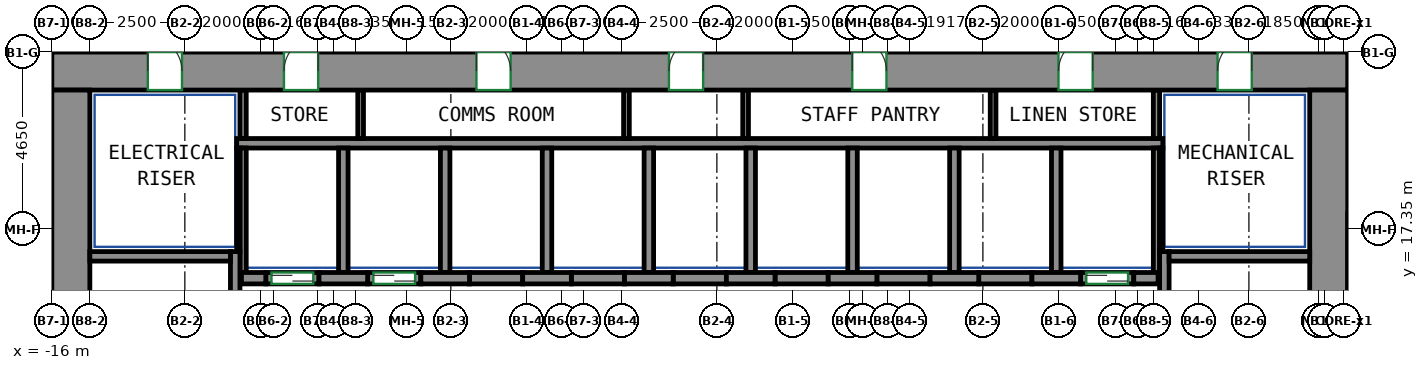
"""IFC4 building model, lengths in metres.
Left out: names, types, materials, properties, quantities, classifications, styles, units other than length and angle.
Written with IfcOpenShell. Run it as: python <this file> out.ifc"""

import sys

from ifc_helpers import new_model, si_unit, direction, frame, frame_2d, origin, place, context, subcontext, project, spatial, rectangle, extrude, source, transform, mapped, element, fill, save


model = new_model("IFC4")
c1 = context("Model", 3, precision=1e-05, world=origin(), true_north=direction((0.0, 1.0)))
c2 = subcontext(c1, "Body", "Model", "MODEL_VIEW")
j1 = project(units=[si_unit("LENGTHUNIT", "METRE"), si_unit("PLANEANGLEUNIT", "RADIAN")], contexts=[c1])
p1 = place(None, origin())
s1 = spatial("IfcSite", under=j1, at=p1, CompositionType="ELEMENT")
p2 = place(p1, origin())
s2 = spatial("IfcBuilding", under=s1, at=p2, CompositionType="ELEMENT")
p3 = place(p2, frame((0.0, 0.0, 63.2)))
s3 = spatial("IfcBuildingStorey", under=s2, at=p3, CompositionType="ELEMENT", Elevation=63.2)
m1 = source(origin(), c2, "Body", "SweptSolid", [
    extrude(rectangle(XDim=34.1, YDim=1.0, at=frame_2d((17.05, 0.0))), origin(), (0.0, 0.0, 1.0), 3.72),
])
p4 = place(p3, frame((-16.0, 21.5, 0.0), z_axis=(0.0, 0.0, 1.0), x_axis=(1.0, 0.0, 0.0)))
e1 = element("IfcWall", 1, at=p4, inside=s3, PredefinedType="SHEAR", context=c2, shape_type="MappedRepresentation", body=[
    mapped(m1, transform((0.0, 0.0, 0.0))),
])
p5 = place(p4, frame((6.108, 0.0, 0.0)))
e2 = element("IfcOpeningElement", 2, at=p5, cuts=e1, PredefinedType="OPENING", context=c2, shape_type="SweptSolid", body=[
    extrude(rectangle(XDim=0.9, YDim=2.1, at=frame_2d((0.45, 1.05))), frame((0.0, 0.51, 0.0), z_axis=(0.0, -1.0, 0.0), x_axis=(1.0, 0.0, 0.0)), (0.0, 0.0, 1.0), 1.02),
])
p6 = place(p4, frame((11.173, 0.0, 0.0)))
e3 = element("IfcOpeningElement", 3, at=p6, cuts=e1, PredefinedType="OPENING", context=c2, shape_type="SweptSolid", body=[
    extrude(rectangle(XDim=0.9, YDim=2.1, at=frame_2d((0.45, 1.05))), frame((0.0, 0.51, 0.0), z_axis=(0.0, -1.0, 0.0), x_axis=(1.0, 0.0, 0.0)), (0.0, 0.0, 1.0), 1.02),
])
p7 = place(p4, frame((16.238, 0.0, 0.0)))
e4 = element("IfcOpeningElement", 4, at=p7, cuts=e1, PredefinedType="OPENING", context=c2, shape_type="SweptSolid", body=[
    extrude(rectangle(XDim=0.9, YDim=2.1, at=frame_2d((0.45, 1.05))), frame((0.0, 0.51, 0.0), z_axis=(0.0, -1.0, 0.0), x_axis=(1.0, 0.0, 0.0)), (0.0, 0.0, 1.0), 1.02),
])
p8 = place(p4, frame((21.062, 0.0, 0.0)))
e5 = element("IfcOpeningElement", 5, at=p8, cuts=e1, PredefinedType="OPENING", context=c2, shape_type="SweptSolid", body=[
    extrude(rectangle(XDim=0.9, YDim=2.1, at=frame_2d((0.45, 1.05))), frame((0.0, 0.51, 0.0), z_axis=(0.0, -1.0, 0.0), x_axis=(1.0, 0.0, 0.0)), (0.0, 0.0, 1.0), 1.02),
])
p9 = place(p4, frame((26.489, 0.0, 0.0)))
e6 = element("IfcOpeningElement", 6, at=p9, cuts=e1, PredefinedType="OPENING", context=c2, shape_type="SweptSolid", body=[
    extrude(rectangle(XDim=0.9, YDim=2.1, at=frame_2d((0.45, 1.05))), frame((0.0, 0.51, 0.0), z_axis=(0.0, -1.0, 0.0), x_axis=(1.0, 0.0, 0.0)), (0.0, 0.0, 1.0), 1.02),
])
p10 = place(p4, frame((2.525, 0.0, 0.0)))
e7 = element("IfcOpeningElement", 7, at=p10, cuts=e1, PredefinedType="OPENING", context=c2, shape_type="SweptSolid", body=[
    extrude(rectangle(XDim=0.9, YDim=2.1, at=frame_2d((0.45, 1.05))), frame((0.0, 0.51, 0.0), z_axis=(0.0, -1.0, 0.0), x_axis=(1.0, 0.0, 0.0)), (0.0, 0.0, 1.0), 1.02),
])
p11 = place(p4, frame((30.675, 0.0, 0.0)))
e8 = element("IfcOpeningElement", 8, at=p11, cuts=e1, PredefinedType="OPENING", context=c2, shape_type="SweptSolid", body=[
    extrude(rectangle(XDim=0.9, YDim=2.1, at=frame_2d((0.45, 1.05))), frame((0.0, 0.51, 0.0), z_axis=(0.0, -1.0, 0.0), x_axis=(1.0, 0.0, 0.0)), (0.0, 0.0, 1.0), 1.02),
])
m2 = source(origin(), c2, "Body", "SweptSolid", [
    extrude(rectangle(XDim=12.0, YDim=1.0, at=frame_2d((6.0, 0.0))), origin(), (0.0, 0.0, 1.0), 3.72),
])
for number, where, z_axis, x_axis in (
    (9, (-15.5, 9.0, 0.0), (0.0, 0.0, 1.0), (0.0, 1.0, 0.0)),
    (10, (17.6, 9.0, 0.0), (0.0, 0.0, 1.0), (0.0, 1.0, 0.0)),
):
    element("IfcWall", number, at=place(p3, frame(where, z_axis=z_axis, x_axis=x_axis)), inside=s3, PredefinedType="SHEAR", context=c2, shape_type="MappedRepresentation", body=[
        mapped(m2, transform((0.0, 0.0, 0.0))),
    ])
m3 = source(origin(), c2, "Body", "SweptSolid", [
    extrude(rectangle(XDim=7.75, YDim=0.25, at=frame_2d((3.875, 0.0))), origin(), (0.0, 0.0, 1.0), 3.72),
])
p12 = place(p3, frame((-11.175, 9.0, 0.0), z_axis=(0.0, 0.0, 1.0), x_axis=(0.0, 1.0, 0.0)))
e11 = element("IfcWall", 11, at=p12, inside=s3, PredefinedType="SHEAR", context=c2, shape_type="MappedRepresentation", body=[
    mapped(m3, transform((0.0, 0.0, 0.0))),
])
m4 = source(origin(), c2, "Body", "SweptSolid", [
    extrude(rectangle(XDim=3.7, YDim=0.25, at=frame_2d((1.85, 0.0))), origin(), (0.0, 0.0, 1.0), 3.72),
])
p13 = place(p3, frame((-15.0, 16.625, 0.0), z_axis=(0.0, 0.0, 1.0), x_axis=(1.0, 0.0, 0.0)))
e12 = element("IfcWall", 12, at=p13, inside=s3, PredefinedType="SHEAR", context=c2, shape_type="MappedRepresentation", body=[
    mapped(m4, transform((0.0, 0.0, 0.0))),
])
p14 = place(p3, frame((13.275, 9.0, 0.0), z_axis=(0.0, 0.0, 1.0), x_axis=(0.0, 1.0, 0.0)))
e13 = element("IfcWall", 13, at=p14, inside=s3, PredefinedType="SHEAR", context=c2, shape_type="MappedRepresentation", body=[
    mapped(m3, transform((0.0, 0.0, 0.0))),
])
m5 = source(origin(), c2, "Body", "SweptSolid", [
    extrude(rectangle(XDim=3.7, YDim=0.25, at=frame_2d((1.85, 0.0))), origin(), (0.0, 0.0, 1.0), 3.72),
])
p15 = place(p3, frame((13.4, 16.625, 0.0), z_axis=(0.0, 0.0, 1.0), x_axis=(1.0, 0.0, 0.0)))
e14 = element("IfcWall", 14, at=p15, inside=s3, PredefinedType="SHEAR", context=c2, shape_type="MappedRepresentation", body=[
    mapped(m5, transform((0.0, 0.0, 0.0))),
])
m6 = source(origin(), c2, "Body", "SweptSolid", [
    extrude(rectangle(XDim=0.64, YDim=0.3, at=frame_2d((0.32, 0.0))), origin(), (0.0, 0.0, 1.0), 3.72),
])
p16 = place(p3, frame((-11.01, 16.05, 0.0), z_axis=(0.0, 0.0, 1.0), x_axis=(1.0, 0.0, 0.0)))
e15 = element("IfcWall", 15, at=p16, inside=s3, PredefinedType="SHEAR", context=c2, shape_type="MappedRepresentation", body=[
    mapped(m6, transform((0.0, 0.0, 0.0))),
])
m7 = source(origin(), c2, "Body", "SweptSolid", [
    extrude(rectangle(XDim=1.28, YDim=0.3, at=frame_2d((0.64, 0.0))), origin(), (0.0, 0.0, 1.0), 3.72),
])
for number, where, z_axis, x_axis in (
    (16, (-8.97, 16.05, 0.0), (0.0, 0.0, 1.0), (1.0, 0.0, 0.0)),
    (17, (-6.29, 16.05, 0.0), (0.0, 0.0, 1.0), (1.0, 0.0, 0.0)),
    (18, (-3.61, 16.05, 0.0), (0.0, 0.0, 1.0), (1.0, 0.0, 0.0)),
    (19, (-0.93, 16.05, 0.0), (0.0, 0.0, 1.0), (1.0, 0.0, 0.0)),
    (20, (1.75, 16.05, 0.0), (0.0, 0.0, 1.0), (1.0, 0.0, 0.0)),
    (21, (4.43, 16.05, 0.0), (0.0, 0.0, 1.0), (1.0, 0.0, 0.0)),
):
    element("IfcWall", number, at=place(p3, frame(where, z_axis=z_axis, x_axis=x_axis)), inside=s3, PredefinedType="SHEAR", context=c2, shape_type="MappedRepresentation", body=[
        mapped(m7, transform((0.0, 0.0, 0.0))),
    ])
m8 = source(origin(), c2, "Body", "SweptSolid", [
    extrude(rectangle(XDim=1.28, YDim=0.3, at=frame_2d((0.64, 0.0))), origin(), (0.0, 0.0, 1.0), 3.72),
])
p17 = place(p3, frame((7.11, 16.05, 0.0), z_axis=(0.0, 0.0, 1.0), x_axis=(1.0, 0.0, 0.0)))
e22 = element("IfcWall", 22, at=p17, inside=s3, PredefinedType="SHEAR", context=c2, shape_type="MappedRepresentation", body=[
    mapped(m8, transform((0.0, 0.0, 0.0))),
])
p18 = place(p3, frame((9.79, 16.05, 0.0), z_axis=(0.0, 0.0, 1.0), x_axis=(1.0, 0.0, 0.0)))
e23 = element("IfcWall", 23, at=p18, inside=s3, PredefinedType="SHEAR", context=c2, shape_type="MappedRepresentation", body=[
    mapped(m7, transform((0.0, 0.0, 0.0))),
])
m9 = source(origin(), c2, "Body", "SweptSolid", [
    extrude(rectangle(XDim=0.64, YDim=0.3, at=frame_2d((0.32, 0.0))), origin(), (0.0, 0.0, 1.0), 3.72),
])
p19 = place(p3, frame((12.47, 16.05, 0.0), z_axis=(0.0, 0.0, 1.0), x_axis=(1.0, 0.0, 0.0)))
e24 = element("IfcWall", 24, at=p19, inside=s3, PredefinedType="SHEAR", context=c2, shape_type="MappedRepresentation", body=[
    mapped(m9, transform((0.0, 0.0, 0.0))),
])
m10 = source(origin(), c2, "Body", "SweptSolid", [
    extrude(rectangle(XDim=1.4, YDim=0.3, at=frame_2d((0.7, 0.0))), origin(), (0.0, 0.0, 1.0), 3.72),
])
p20 = place(p3, frame((11.07, 16.05, 0.0), z_axis=(0.0, 0.0, 1.0), x_axis=(1.0, 0.0, 0.0)))
e25 = element("IfcWall", 25, at=p20, inside=s3, PredefinedType="PARTITIONING", context=c2, shape_type="MappedRepresentation", body=[
    mapped(m10, transform((0.0, 0.0, 0.0))),
])
p21 = place(p20, frame((0.15, 0.0, 0.0)))
e26 = element("IfcOpeningElement", 26, at=p21, cuts=e25, PredefinedType="OPENING", context=c2, shape_type="SweptSolid", body=[
    extrude(rectangle(XDim=1.1, YDim=2.1, at=frame_2d((0.55, 1.05))), frame((0.0, 0.16, 0.0), z_axis=(0.0, -1.0, 0.0), x_axis=(1.0, 0.0, 0.0)), (0.0, 0.0, 1.0), 0.32),
])
m11 = source(origin(), c2, "Body", "SweptSolid", [
    extrude(rectangle(XDim=1.4, YDim=0.3, at=frame_2d((0.7, 0.0))), origin(), (0.0, 0.0, 1.0), 3.72),
])
p22 = place(p3, frame((-10.37, 16.05, 0.0), z_axis=(0.0, 0.0, 1.0), x_axis=(1.0, 0.0, 0.0)))
e27 = element("IfcWall", 27, at=p22, inside=s3, PredefinedType="PARTITIONING", context=c2, shape_type="MappedRepresentation", body=[
    mapped(m11, transform((0.0, 0.0, 0.0))),
])
p23 = place(p22, frame((0.15, 0.0, 0.0)))
e28 = element("IfcOpeningElement", 28, at=p23, cuts=e27, PredefinedType="OPENING", context=c2, shape_type="SweptSolid", body=[
    extrude(rectangle(XDim=1.1, YDim=2.1, at=frame_2d((0.55, 1.05))), frame((0.0, 0.16, 0.0), z_axis=(0.0, -1.0, 0.0), x_axis=(1.0, 0.0, 0.0)), (0.0, 0.0, 1.0), 0.32),
])
p24 = place(p3, frame((-7.69, 16.05, 0.0), z_axis=(0.0, 0.0, 1.0), x_axis=(1.0, 0.0, 0.0)))
e29 = element("IfcWall", 29, at=p24, inside=s3, PredefinedType="PARTITIONING", context=c2, shape_type="MappedRepresentation", body=[
    mapped(m10, transform((0.0, 0.0, 0.0))),
])
p25 = place(p24, frame((0.15, 0.0, 0.0)))
e30 = element("IfcOpeningElement", 30, at=p25, cuts=e29, PredefinedType="OPENING", context=c2, shape_type="SweptSolid", body=[
    extrude(rectangle(XDim=1.1, YDim=2.1, at=frame_2d((0.55, 1.05))), frame((0.0, 0.16, 0.0), z_axis=(0.0, -1.0, 0.0), x_axis=(1.0, 0.0, 0.0)), (0.0, 0.0, 1.0), 0.32),
])
p26 = place(p3, frame((-5.01, 16.05, 0.0), z_axis=(0.0, 0.0, 1.0), x_axis=(1.0, 0.0, 0.0)))
e31 = element("IfcWall", 31, at=p26, inside=s3, PredefinedType="PARTITIONING", context=c2, shape_type="MappedRepresentation", body=[
    mapped(m10, transform((0.0, 0.0, 0.0))),
])
p27 = place(p3, frame((-2.33, 16.05, 0.0), z_axis=(0.0, 0.0, 1.0), x_axis=(1.0, 0.0, 0.0)))
e32 = element("IfcWall", 32, at=p27, inside=s3, PredefinedType="PARTITIONING", context=c2, shape_type="MappedRepresentation", body=[
    mapped(m11, transform((0.0, 0.0, 0.0))),
])
for number, where, z_axis, x_axis in (
    (33, (0.35, 16.05, 0.0), (0.0, 0.0, 1.0), (1.0, 0.0, 0.0)),
    (34, (3.03, 16.05, 0.0), (0.0, 0.0, 1.0), (1.0, 0.0, 0.0)),
):
    element("IfcWall", number, at=place(p3, frame(where, z_axis=z_axis, x_axis=x_axis)), inside=s3, PredefinedType="PARTITIONING", context=c2, shape_type="MappedRepresentation", body=[
        mapped(m10, transform((0.0, 0.0, 0.0))),
    ])
for number, where, z_axis, x_axis in (
    (35, (5.71, 16.05, 0.0), (0.0, 0.0, 1.0), (1.0, 0.0, 0.0)),
    (36, (8.39, 16.05, 0.0), (0.0, 0.0, 1.0), (1.0, 0.0, 0.0)),
):
    element("IfcWall", number, at=place(p3, frame(where, z_axis=z_axis, x_axis=x_axis)), inside=s3, PredefinedType="PARTITIONING", context=c2, shape_type="MappedRepresentation", body=[
        mapped(m11, transform((0.0, 0.0, 0.0))),
    ])
m12 = source(origin(), c2, "Body", "SweptSolid", [
    extrude(rectangle(XDim=24.37, YDim=0.25, at=frame_2d((12.185, 0.0))), origin(), (0.0, 0.0, 1.0), 3.72),
])
p28 = place(p3, frame((-11.135, 19.6, 0.0), z_axis=(0.0, 0.0, 1.0), x_axis=(1.0, 0.0, 0.0)))
e37 = element("IfcWall", 37, at=p28, inside=s3, PredefinedType="PARTITIONING", context=c2, shape_type="MappedRepresentation", body=[
    mapped(m12, transform((0.0, 0.0, 0.0))),
])
m13 = source(origin(), c2, "Body", "SweptSolid", [
    extrude(rectangle(XDim=3.275, YDim=0.165, at=frame_2d((1.638, 0.0))), origin(), (0.0, 0.0, 1.0), 3.72),
])
p29 = place(p3, frame((13.067, 16.2, 0.0), z_axis=(0.0, 0.0, 1.0), x_axis=(0.0, 1.0, 0.0)))
e38 = element("IfcWall", 38, at=p29, inside=s3, PredefinedType="PARTITIONING", context=c2, shape_type="MappedRepresentation", body=[
    mapped(m13, transform((0.0, 0.0, 0.0))),
])
m14 = source(origin(), c2, "Body", "SweptSolid", [
    extrude(rectangle(XDim=1.275, YDim=0.165, at=frame_2d((0.637, 0.0))), origin(), (0.0, 0.0, 1.0), 3.72),
])
p30 = place(p3, frame((13.067, 19.725, 0.0), z_axis=(0.0, 0.0, 1.0), x_axis=(0.0, 1.0, 0.0)))
e39 = element("IfcWall", 39, at=p30, inside=s3, PredefinedType="PARTITIONING", context=c2, shape_type="MappedRepresentation", body=[
    mapped(m14, transform((0.0, 0.0, 0.0))),
])
p31 = place(p3, frame((-10.968, 16.2, 0.0), z_axis=(0.0, 0.0, 1.0), x_axis=(0.0, 1.0, 0.0)))
e40 = element("IfcWall", 40, at=p31, inside=s3, PredefinedType="PARTITIONING", context=c2, shape_type="MappedRepresentation", body=[
    mapped(m13, transform((0.0, 0.0, 0.0))),
])
p32 = place(p3, frame((-10.968, 19.725, 0.0), z_axis=(0.0, 0.0, 1.0), x_axis=(0.0, 1.0, 0.0)))
e41 = element("IfcWall", 41, at=p32, inside=s3, PredefinedType="PARTITIONING", context=c2, shape_type="MappedRepresentation", body=[
    mapped(m14, transform((0.0, 0.0, 0.0))),
])
m15 = source(origin(), c2, "Body", "SweptSolid", [
    extrude(rectangle(XDim=3.275, YDim=0.25, at=frame_2d((1.638, 0.0))), origin(), (0.0, 0.0, 1.0), 3.72),
])
p33 = place(p3, frame((10.43, 16.2, 0.0), z_axis=(0.0, 0.0, 1.0), x_axis=(0.0, 1.0, 0.0)))
e42 = element("IfcWall", 42, at=p33, inside=s3, PredefinedType="PARTITIONING", context=c2, shape_type="MappedRepresentation", body=[
    mapped(m15, transform((0.0, 0.0, 0.0))),
])
m16 = source(origin(), c2, "Body", "SweptSolid", [
    extrude(rectangle(XDim=2.725, YDim=0.085, at=frame_2d((1.363, 0.0))), origin(), (0.0, 0.0, 1.0), 3.72),
])
p34 = place(p3, frame((13.192, 16.75, 0.0), z_axis=(0.0, 0.0, 1.0), x_axis=(0.0, 1.0, 0.0)))
e43 = element("IfcWall", 43, at=p34, inside=s3, PredefinedType="PARTITIONING", context=c2, shape_type="MappedRepresentation", body=[
    mapped(m16, transform((0.0, 0.0, 0.0))),
])
for number, where, z_axis, x_axis in (
    (44, (2.39, 16.2, 0.0), (0.0, 0.0, 1.0), (0.0, 1.0, 0.0)),
    (45, (5.07, 16.2, 0.0), (0.0, 0.0, 1.0), (0.0, 1.0, 0.0)),
    (46, (7.75, 16.2, 0.0), (0.0, 0.0, 1.0), (0.0, 1.0, 0.0)),
    (47, (-0.29, 16.2, 0.0), (0.0, 0.0, 1.0), (0.0, 1.0, 0.0)),
):
    element("IfcWall", number, at=place(p3, frame(where, z_axis=z_axis, x_axis=x_axis)), inside=s3, PredefinedType="PARTITIONING", context=c2, shape_type="MappedRepresentation", body=[
        mapped(m15, transform((0.0, 0.0, 0.0))),
    ])
p35 = place(p3, frame((-11.093, 16.75, 0.0), z_axis=(0.0, 0.0, 1.0), x_axis=(0.0, 1.0, 0.0)))
e48 = element("IfcWall", 48, at=p35, inside=s3, PredefinedType="PARTITIONING", context=c2, shape_type="MappedRepresentation", body=[
    mapped(m16, transform((0.0, 0.0, 0.0))),
])
for number, where, z_axis, x_axis in (
    (49, (-2.97, 16.2, 0.0), (0.0, 0.0, 1.0), (0.0, 1.0, 0.0)),
    (50, (-5.65, 16.2, 0.0), (0.0, 0.0, 1.0), (0.0, 1.0, 0.0)),
    (51, (-8.33, 16.2, 0.0), (0.0, 0.0, 1.0), (0.0, 1.0, 0.0)),
):
    element("IfcWall", number, at=place(p3, frame(where, z_axis=z_axis, x_axis=x_axis)), inside=s3, PredefinedType="PARTITIONING", context=c2, shape_type="MappedRepresentation", body=[
        mapped(m15, transform((0.0, 0.0, 0.0))),
    ])
m17 = source(origin(), c2, "Body", "SweptSolid", [
    extrude(rectangle(XDim=1.275, YDim=0.15, at=frame_2d((0.637, 0.0))), origin(), (0.0, 0.0, 1.0), 3.72),
])
for number, where, z_axis, x_axis in (
    (52, (-7.875, 19.725, 0.0), (0.0, 0.0, 1.0), (0.0, 1.0, 0.0)),
    (53, (-0.88, 19.725, 0.0), (0.0, 0.0, 1.0), (0.0, 1.0, 0.0)),
    (54, (2.256, 19.725, 0.0), (0.0, 0.0, 1.0), (0.0, 1.0, 0.0)),
    (55, (8.768, 19.725, 0.0), (0.0, 0.0, 1.0), (0.0, 1.0, 0.0)),
):
    element("IfcWall", number, at=place(p3, frame(where, z_axis=z_axis, x_axis=x_axis)), inside=s3, PredefinedType="PARTITIONING", context=c2, shape_type="MappedRepresentation", body=[
        mapped(m17, transform((0.0, 0.0, 0.0))),
    ])
p36 = place(p21, origin())
e56 = element("IfcDoor", 56, at=p36, inside=s3, OperationType="DOUBLE_DOOR_SLIDING", PredefinedType="DOOR", context=c2, shape_type="SweptSolid", body=[
    extrude(rectangle(XDim=1.1, YDim=2.1, at=frame_2d((0.55, 1.05))), frame((0.0, 0.025, 0.0), z_axis=(0.0, -1.0, 0.0), x_axis=(1.0, 0.0, 0.0)), (0.0, 0.0, 1.0), 0.05),
])
fill(e26, e56)
p37 = place(p23, origin())
e57 = element("IfcDoor", 57, at=p37, inside=s3, OperationType="DOUBLE_DOOR_SLIDING", PredefinedType="DOOR", context=c2, shape_type="SweptSolid", body=[
    extrude(rectangle(XDim=1.1, YDim=2.1, at=frame_2d((0.55, 1.05))), frame((0.0, 0.025, 0.0), z_axis=(0.0, -1.0, 0.0), x_axis=(1.0, 0.0, 0.0)), (0.0, 0.0, 1.0), 0.05),
])
fill(e28, e57)
p38 = place(p25, origin())
e58 = element("IfcDoor", 58, at=p38, inside=s3, OperationType="DOUBLE_DOOR_SLIDING", PredefinedType="DOOR", context=c2, shape_type="SweptSolid", body=[
    extrude(rectangle(XDim=1.1, YDim=2.1, at=frame_2d((0.55, 1.05))), frame((0.0, 0.025, 0.0), z_axis=(0.0, -1.0, 0.0), x_axis=(1.0, 0.0, 0.0)), (0.0, 0.0, 1.0), 0.05),
])
fill(e30, e58)
p39 = place(p5, origin())
e59 = element("IfcDoor", 59, at=p39, inside=s3, OperationType="SINGLE_SWING_RIGHT", PredefinedType="DOOR", context=c2, shape_type="SweptSolid", body=[
    extrude(rectangle(XDim=0.9, YDim=2.1, at=frame_2d((0.45, 1.05))), frame((0.0, -0.355, 0.0), z_axis=(0.0, -1.0, 0.0), x_axis=(1.0, 0.0, 0.0)), (0.0, 0.0, 1.0), 0.05),
])
fill(e2, e59)
p40 = place(p6, origin())
e60 = element("IfcDoor", 60, at=p40, inside=s3, OperationType="SINGLE_SWING_LEFT", PredefinedType="DOOR", context=c2, shape_type="SweptSolid", body=[
    extrude(rectangle(XDim=0.9, YDim=2.1, at=frame_2d((0.45, 1.05))), frame((0.0, -0.355, 0.0), z_axis=(0.0, -1.0, 0.0), x_axis=(1.0, 0.0, 0.0)), (0.0, 0.0, 1.0), 0.05),
])
fill(e3, e60)
p41 = place(p7, origin())
e61 = element("IfcDoor", 61, at=p41, inside=s3, OperationType="SINGLE_SWING_RIGHT", PredefinedType="DOOR", context=c2, shape_type="SweptSolid", body=[
    extrude(rectangle(XDim=0.9, YDim=2.1, at=frame_2d((0.45, 1.05))), frame((0.0, -0.355, 0.0), z_axis=(0.0, -1.0, 0.0), x_axis=(1.0, 0.0, 0.0)), (0.0, 0.0, 1.0), 0.05),
])
fill(e4, e61)
p42 = place(p8, origin())
e62 = element("IfcDoor", 62, at=p42, inside=s3, OperationType="SINGLE_SWING_LEFT", PredefinedType="DOOR", context=c2, shape_type="SweptSolid", body=[
    extrude(rectangle(XDim=0.9, YDim=2.1, at=frame_2d((0.45, 1.05))), frame((0.0, -0.355, 0.0), z_axis=(0.0, -1.0, 0.0), x_axis=(1.0, 0.0, 0.0)), (0.0, 0.0, 1.0), 0.05),
])
fill(e5, e62)
p43 = place(p9, origin())
e63 = element("IfcDoor", 63, at=p43, inside=s3, OperationType="SINGLE_SWING_RIGHT", PredefinedType="DOOR", context=c2, shape_type="SweptSolid", body=[
    extrude(rectangle(XDim=0.9, YDim=2.1, at=frame_2d((0.45, 1.05))), frame((0.0, -0.355, 0.0), z_axis=(0.0, -1.0, 0.0), x_axis=(1.0, 0.0, 0.0)), (0.0, 0.0, 1.0), 0.05),
])
fill(e6, e63)
p44 = place(p10, origin())
e64 = element("IfcDoor", 64, at=p44, inside=s3, OperationType="SINGLE_SWING_LEFT", PredefinedType="DOOR", context=c2, shape_type="SweptSolid", body=[
    extrude(rectangle(XDim=0.9, YDim=2.1, at=frame_2d((0.45, 1.05))), frame((0.0, -0.355, 0.0), z_axis=(0.0, -1.0, 0.0), x_axis=(1.0, 0.0, 0.0)), (0.0, 0.0, 1.0), 0.05),
])
fill(e7, e64)
p45 = place(p11, origin())
e65 = element("IfcDoor", 65, at=p45, inside=s3, OperationType="SINGLE_SWING_RIGHT", PredefinedType="DOOR", context=c2, shape_type="SweptSolid", body=[
    extrude(rectangle(XDim=0.9, YDim=2.1, at=frame_2d((0.45, 1.05))), frame((0.0, -0.355, 0.0), z_axis=(0.0, -1.0, 0.0), x_axis=(1.0, 0.0, 0.0)), (0.0, 0.0, 1.0), 0.05),
])
fill(e8, e65)
save(model, sys.argv[1])
